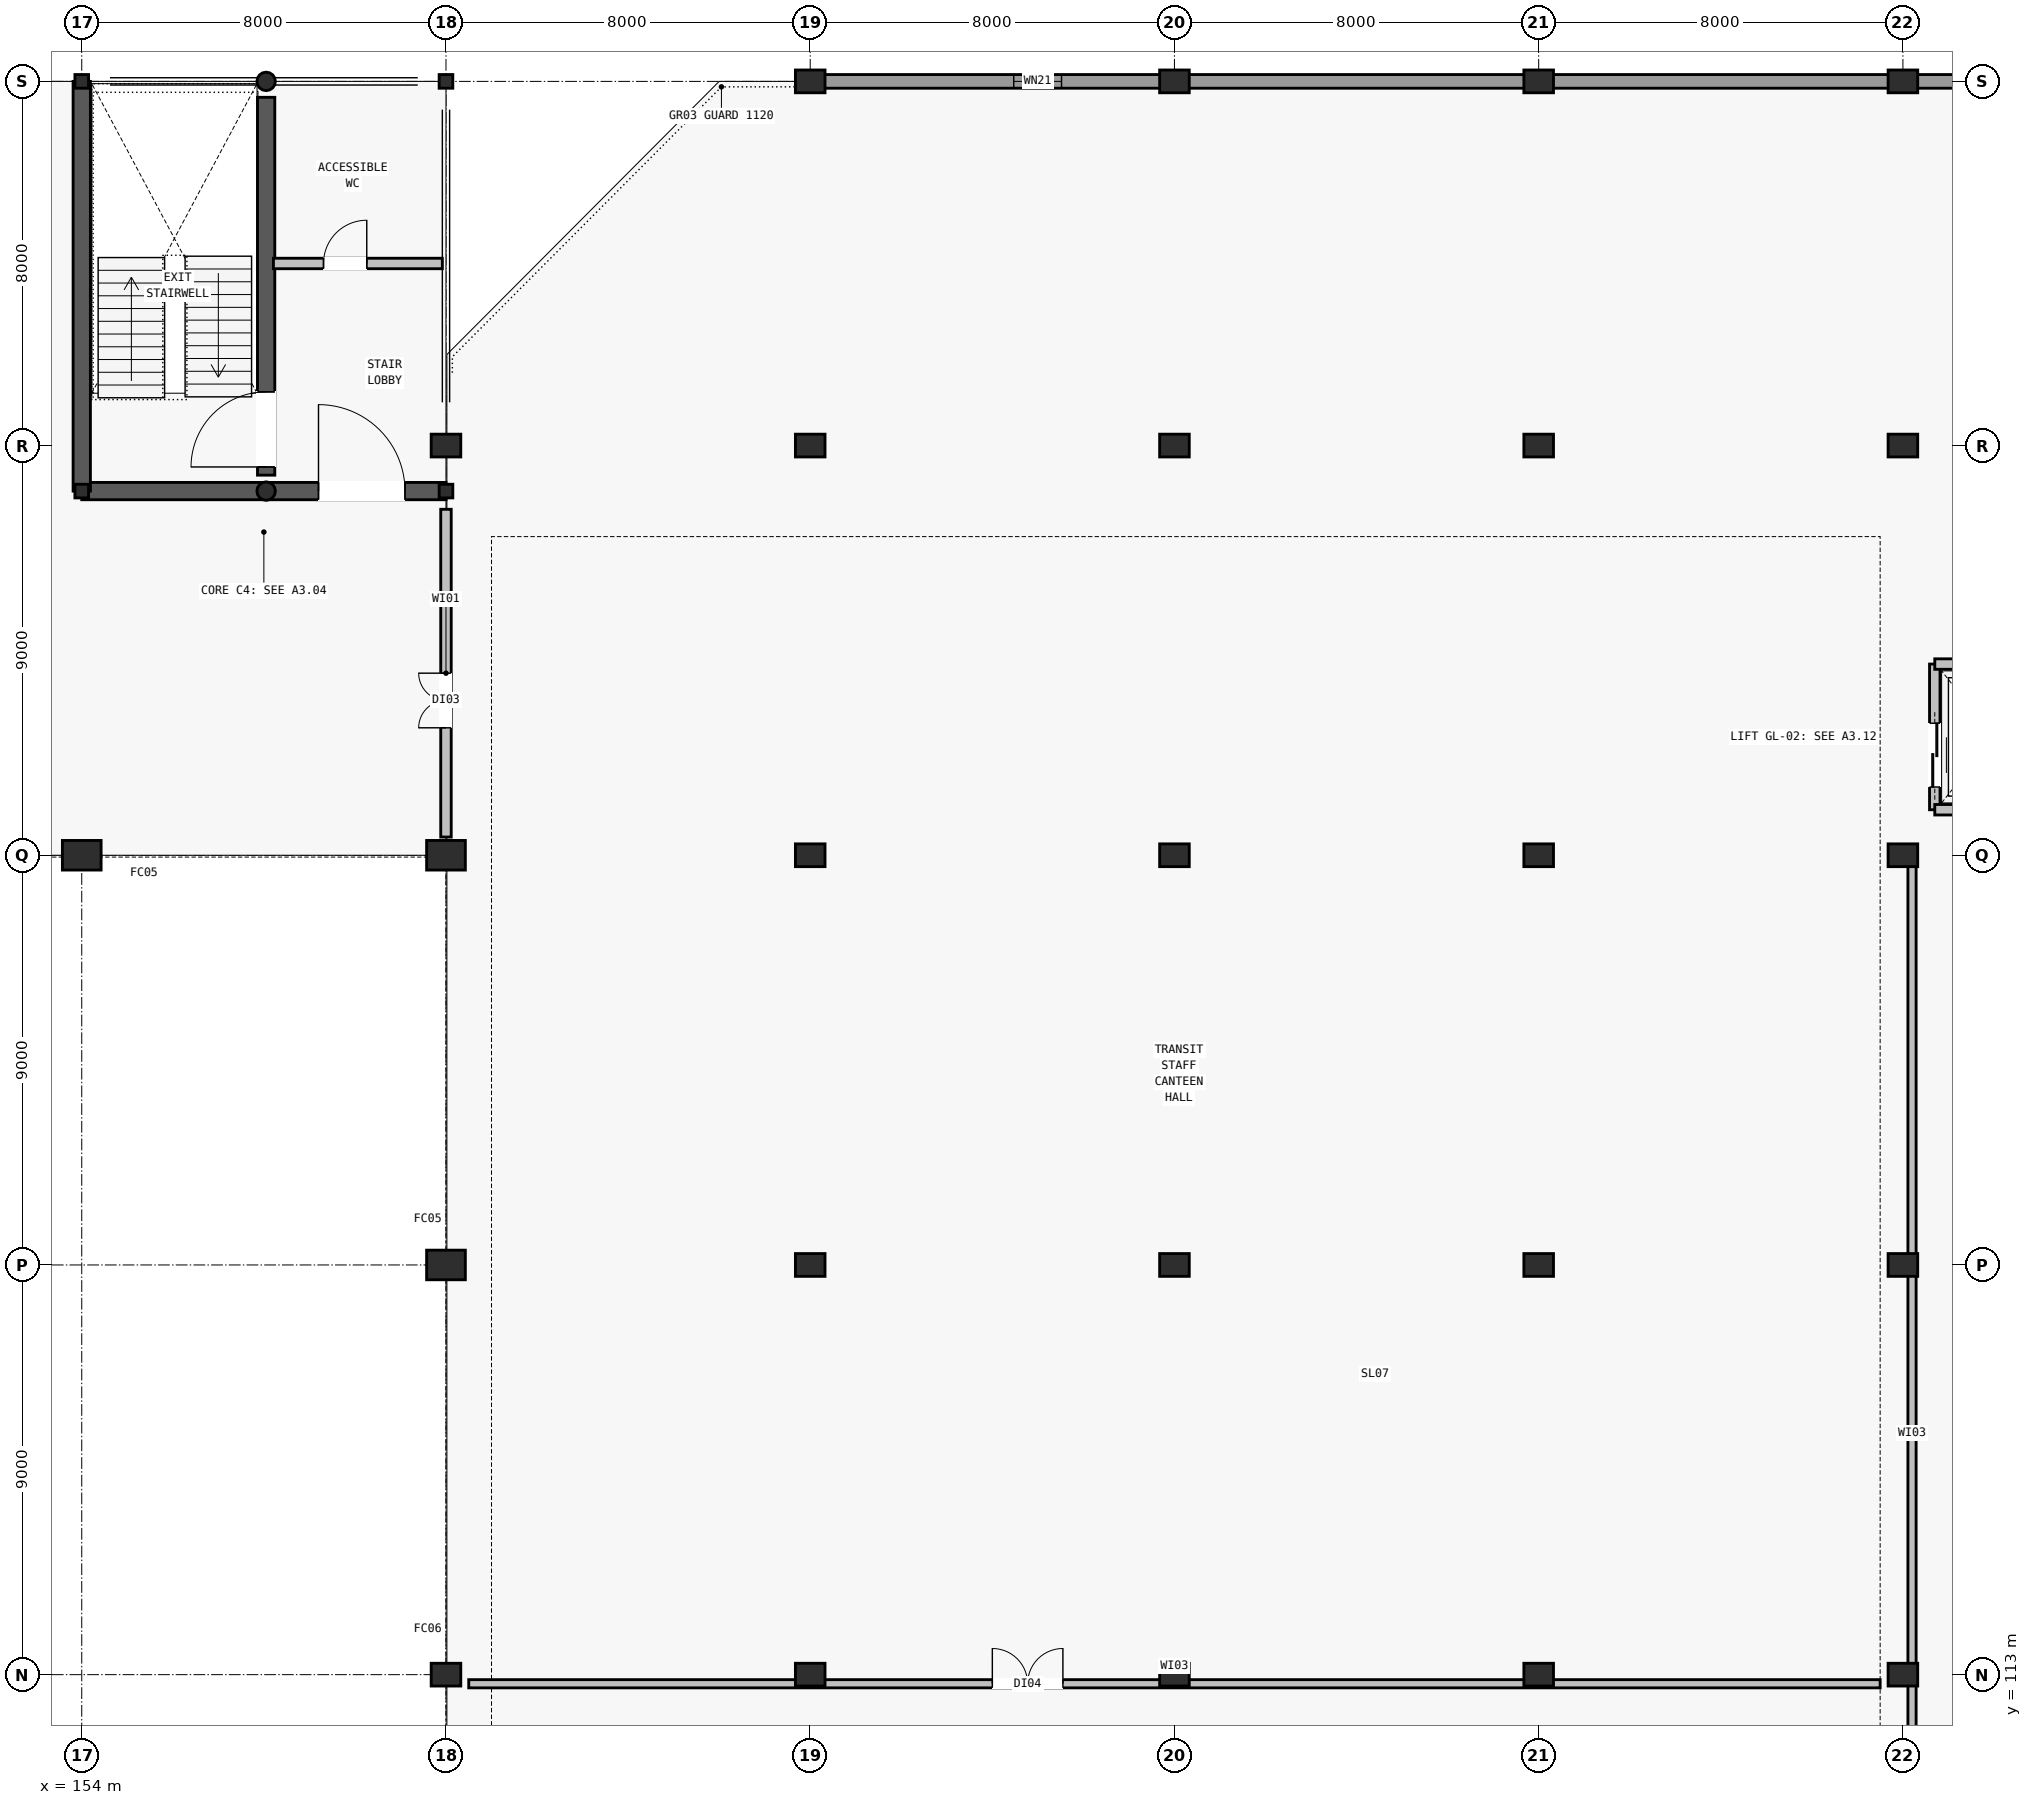
"""IFC4 building model, lengths in metres.
Left out: names, types, materials, properties, quantities, classifications, styles, units other than length and angle.
Written with IfcOpenShell. Run it as: python <this file> out.ifc"""

import sys

from ifc_helpers import new_model, si_unit, direction, frame, frame_2d, origin, origin_2d, place, context, subcontext, project, spatial, rectangle, hollow_circle, i_section, extrude, element, fill, save


model = new_model("IFC4")
c1 = context("Model", 3, precision=1e-05, world=origin(), true_north=direction((0.0, 1.0)))
c2 = subcontext(c1, "Body", "Model", "MODEL_VIEW")
j1 = project(units=[si_unit("LENGTHUNIT", "METRE"), si_unit("PLANEANGLEUNIT", "RADIAN")], contexts=[c1])
p1 = place(None, origin())
s1 = spatial("IfcSite", under=j1, at=p1, CompositionType="ELEMENT")
p2 = place(p1, origin())
s2 = spatial("IfcBuilding", under=s1, at=p2, CompositionType="ELEMENT")
p3 = place(p2, frame((0.0, 0.0, 13.4)))
s3 = spatial("IfcBuildingStorey", under=s2, at=p3, CompositionType="ELEMENT", Elevation=13.4)
for number, where, z_axis, x_axis in (
    (1, (154.0, 148.0, 0.0), (0.0, 0.0, 1.0), (1.0, 0.0, 0.0)),
    (2, (162.0, 148.0, 0.0), (0.0, 0.0, 1.0), (1.0, 0.0, 0.0)),
    (3, (154.0, 139.0, 0.0), (0.0, 0.0, 1.0), (1.0, 0.0, 0.0)),
    (4, (162.0, 139.0, 0.0), (0.0, 0.0, 1.0), (1.0, 0.0, 0.0)),
):
    element("IfcColumn", number, at=place(p3, frame(where, z_axis=z_axis, x_axis=x_axis)), inside=s3, PredefinedType="COLUMN", context=c2, shape_type="SweptSolid", body=[
        extrude(i_section(OverallWidth=0.3, OverallDepth=0.3, WebThickness=0.01, FlangeThickness=0.015, FilletRadius=0.018, at=origin_2d()), origin(), (0.0, 0.0, 1.0), 3.9),
    ])
for number, where, z_axis, x_axis in (
    (5, (158.05, 139.0, 0.0), (0.0, 0.0, 1.0), (1.0, 0.0, 0.0)),
    (6, (158.05, 148.0, 0.0), (0.0, 0.0, 1.0), (1.0, 0.0, 0.0)),
):
    element("IfcColumn", number, at=place(p3, frame(where, z_axis=z_axis, x_axis=x_axis)), inside=s3, PredefinedType="COLUMN", context=c2, shape_type="SweptSolid", body=[
        extrude(hollow_circle(Radius=0.203, WallThickness=0.014, at=origin_2d()), origin(), (0.0, 0.0, 1.0), 3.9),
    ])
for number, where, z_axis, x_axis in (
    (7, (154.0, 131.0, 0.0), (0.0, 0.0, 1.0), (1.0, 0.0, 0.0)),
    (8, (162.0, 122.0, 0.0), (0.0, 0.0, 1.0), (1.0, 0.0, 0.0)),
    (9, (162.0, 131.0, 0.0), (0.0, 0.0, 1.0), (1.0, 0.0, 0.0)),
):
    element("IfcColumn", number, at=place(p3, frame(where, z_axis=z_axis, x_axis=x_axis)), inside=s3, PredefinedType="COLUMN", context=c2, shape_type="SweptSolid", body=[
        extrude(rectangle(XDim=0.85, YDim=0.65, at=origin_2d()), origin(), (0.0, 0.0, 1.0), 3.9),
    ])
for number, where, z_axis, x_axis in (
    (10, (162.0, 113.0, 0.0), (0.0, 0.0, 1.0), (1.0, 0.0, 0.0)),
    (11, (162.0, 140.0, 0.0), (0.0, 0.0, 1.0), (1.0, 0.0, 0.0)),
    (12, (170.0, 113.0, 0.0), (0.0, 0.0, 1.0), (1.0, 0.0, 0.0)),
    (13, (170.0, 122.0, 0.0), (0.0, 0.0, 1.0), (1.0, 0.0, 0.0)),
    (14, (170.0, 131.0, 0.0), (0.0, 0.0, 1.0), (1.0, 0.0, 0.0)),
    (15, (170.0, 140.0, 0.0), (0.0, 0.0, 1.0), (1.0, 0.0, 0.0)),
    (16, (170.0, 148.0, 0.0), (0.0, 0.0, 1.0), (1.0, 0.0, 0.0)),
    (17, (178.0, 113.0, 0.0), (0.0, 0.0, 1.0), (1.0, 0.0, 0.0)),
    (18, (178.0, 122.0, 0.0), (0.0, 0.0, 1.0), (1.0, 0.0, 0.0)),
    (19, (178.0, 131.0, 0.0), (0.0, 0.0, 1.0), (1.0, 0.0, 0.0)),
    (20, (178.0, 140.0, 0.0), (0.0, 0.0, 1.0), (1.0, 0.0, 0.0)),
    (21, (178.0, 148.0, 0.0), (0.0, 0.0, 1.0), (1.0, 0.0, 0.0)),
    (22, (186.0, 113.0, 0.0), (0.0, 0.0, 1.0), (1.0, 0.0, 0.0)),
    (23, (186.0, 122.0, 0.0), (0.0, 0.0, 1.0), (1.0, 0.0, 0.0)),
    (24, (186.0, 131.0, 0.0), (0.0, 0.0, 1.0), (1.0, 0.0, 0.0)),
    (25, (186.0, 140.0, 0.0), (0.0, 0.0, 1.0), (1.0, 0.0, 0.0)),
    (26, (186.0, 148.0, 0.0), (0.0, 0.0, 1.0), (1.0, 0.0, 0.0)),
    (27, (194.0, 113.0, 0.0), (0.0, 0.0, 1.0), (1.0, 0.0, 0.0)),
    (28, (194.0, 122.0, 0.0), (0.0, 0.0, 1.0), (1.0, 0.0, 0.0)),
    (29, (194.0, 131.0, 0.0), (0.0, 0.0, 1.0), (1.0, 0.0, 0.0)),
    (30, (194.0, 140.0, 0.0), (0.0, 0.0, 1.0), (1.0, 0.0, 0.0)),
    (31, (194.0, 148.0, 0.0), (0.0, 0.0, 1.0), (1.0, 0.0, 0.0)),
):
    element("IfcColumn", number, at=place(p3, frame(where, z_axis=z_axis, x_axis=x_axis)), inside=s3, PredefinedType="COLUMN", context=c2, shape_type="SweptSolid", body=[
        extrude(rectangle(XDim=0.65, YDim=0.5, at=origin_2d()), origin(), (0.0, 0.0, 1.0), 3.9),
    ])
p4 = place(p3, frame((177.695, 148.0, 0.0), z_axis=(0.0, 0.0, 1.0), x_axis=(-1.0, 0.0, 0.0)))
e32 = element("IfcWall", 32, at=p4, inside=s3, PredefinedType="STANDARD", context=c2, shape_type="SweptSolid", body=[
    extrude(rectangle(XDim=7.39, YDim=0.3, at=frame_2d((3.695, 0.0))), origin(), (0.0, 0.0, 1.0), 2.48),
])
p5 = place(p4, frame((2.175, 0.0, 0.95)))
e33 = element("IfcOpeningElement", 33, at=p5, cuts=e32, PredefinedType="OPENING", context=c2, shape_type="SweptSolid", body=[
    extrude(rectangle(XDim=1.05, YDim=1.25, at=frame_2d((0.525, 0.625))), frame((0.0, 0.16, 0.0), z_axis=(0.0, -1.0, 0.0), x_axis=(1.0, 0.0, 0.0)), (0.0, 0.0, 1.0), 0.32),
])
for number, where, z_axis, x_axis in (
    (34, (185.695, 148.0, 0.0), (0.0, 0.0, 1.0), (-1.0, 0.0, 0.0)),
    (35, (193.695, 148.0, 0.0), (0.0, 0.0, 1.0), (-1.0, 0.0, 0.0)),
    (36, (201.695, 148.0, 0.0), (0.0, 0.0, 1.0), (-1.0, 0.0, 0.0)),
):
    element("IfcWall", number, at=place(p3, frame(where, z_axis=z_axis, x_axis=x_axis)), inside=s3, PredefinedType="STANDARD", context=c2, shape_type="SweptSolid", body=[
        extrude(rectangle(XDim=7.39, YDim=0.3, at=frame_2d((3.695, 0.0))), origin(), (0.0, 0.0, 1.0), 2.48),
    ])
p6 = place(p3, frame((154.0, 139.0, 0.0), z_axis=(0.0, 0.0, 1.0), x_axis=(1.0, 0.0, 0.0)))
e37 = element("IfcWall", 37, at=p6, inside=s3, PredefinedType="SHEAR", context=c2, shape_type="SweptSolid", body=[
    extrude(rectangle(XDim=8.0, YDim=0.38, at=frame_2d((4.0, 0.0))), origin(), (0.0, 0.0, 1.0), 3.62),
])
p7 = place(p6, frame((5.2, 0.0, 0.0)))
e38 = element("IfcOpeningElement", 38, at=p7, cuts=e37, PredefinedType="OPENING", context=c2, shape_type="SweptSolid", body=[
    extrude(rectangle(XDim=1.9, YDim=2.3, at=frame_2d((0.95, 1.15))), frame((0.0, 0.2, 0.0), z_axis=(0.0, -1.0, 0.0), x_axis=(1.0, 0.0, 0.0)), (0.0, 0.0, 1.0), 0.4),
])
p8 = place(p3, frame((154.0, 148.0, 0.0), z_axis=(0.0, 0.0, 1.0), x_axis=(0.0, -1.0, 0.0)))
e39 = element("IfcWall", 39, at=p8, inside=s3, PredefinedType="SHEAR", context=c2, shape_type="SweptSolid", body=[
    extrude(rectangle(XDim=9.0, YDim=0.38, at=frame_2d((4.5, 0.0))), origin(), (0.0, 0.0, 1.0), 3.62),
])
p9 = place(p3, frame((158.05, 139.35, 0.0), z_axis=(0.0, 0.0, 1.0), x_axis=(0.0, 1.0, 0.0)))
e40 = element("IfcWall", 40, at=p9, inside=s3, PredefinedType="SHEAR", context=c2, shape_type="SweptSolid", body=[
    extrude(rectangle(XDim=8.3, YDim=0.38, at=frame_2d((4.15, 0.0))), origin(), (0.0, 0.0, 1.0), 3.62),
])
p10 = place(p9, frame((0.18, 0.0, 0.0)))
e41 = element("IfcOpeningElement", 41, at=p10, cuts=e40, PredefinedType="OPENING", context=c2, shape_type="SweptSolid", body=[
    extrude(rectangle(XDim=1.65, YDim=2.2, at=frame_2d((0.825, 1.1))), frame((0.0, 0.2, 0.0), z_axis=(0.0, -1.0, 0.0), x_axis=(1.0, 0.0, 0.0)), (0.0, 0.0, 1.0), 0.4),
])
p11 = place(p3, frame((158.21, 144.0, 0.0), z_axis=(0.0, 0.0, 1.0), x_axis=(1.0, 0.0, 0.0)))
e42 = element("IfcWall", 42, at=p11, inside=s3, PredefinedType="PARTITIONING", context=c2, shape_type="SweptSolid", body=[
    extrude(rectangle(XDim=3.71, YDim=0.23, at=frame_2d((1.855, 0.0))), origin(), (0.0, 0.0, 1.0), 2.48),
])
p12 = place(p11, frame((1.1, 0.0, 0.0)))
e43 = element("IfcOpeningElement", 43, at=p12, cuts=e42, PredefinedType="OPENING", context=c2, shape_type="SweptSolid", body=[
    extrude(rectangle(XDim=0.95, YDim=2.1, at=frame_2d((0.475, 1.05))), frame((0.0, 0.125, 0.0), z_axis=(0.0, -1.0, 0.0), x_axis=(1.0, 0.0, 0.0)), (0.0, 0.0, 1.0), 0.25),
])
p13 = place(p3, frame((194.7, 132.0, 0.0), z_axis=(0.0, 0.0, 1.0), x_axis=(0.0, 1.0, 0.0)))
e44 = element("IfcWall", 44, at=p13, inside=s3, PredefinedType="PARTITIONING", context=c2, shape_type="SweptSolid", body=[
    extrude(rectangle(XDim=3.2, YDim=0.23, at=frame_2d((1.6, 0.0))), origin(), (0.0, 0.0, 1.0), 2.48),
])
p14 = place(p13, frame((0.5, 0.0, 0.0)))
e45 = element("IfcOpeningElement", 45, at=p14, cuts=e44, PredefinedType="OPENING", context=c2, shape_type="SweptSolid", body=[
    extrude(rectangle(XDim=1.4, YDim=2.3, at=frame_2d((0.7, 1.15))), frame((0.0, 0.125, 0.0), z_axis=(0.0, -1.0, 0.0), x_axis=(1.0, 0.0, 0.0)), (0.0, 0.0, 1.0), 0.25),
])
for number, where, z_axis, x_axis in (
    (46, (194.7, 135.2, 0.0), (0.0, 0.0, 1.0), (1.0, 0.0, 0.0)),
    (47, (197.3, 132.0, 0.0), (0.0, 0.0, 1.0), (-1.0, 0.0, 0.0)),
):
    element("IfcWall", number, at=place(p3, frame(where, z_axis=z_axis, x_axis=x_axis)), inside=s3, PredefinedType="PARTITIONING", context=c2, shape_type="SweptSolid", body=[
        extrude(rectangle(XDim=2.6, YDim=0.23, at=frame_2d((1.3, 0.0))), origin(), (0.0, 0.0, 1.0), 2.48),
    ])
p15 = place(p3, frame((162.0, 131.4, 0.0), z_axis=(0.0, 0.0, 1.0), x_axis=(0.0, 1.0, 0.0)))
e48 = element("IfcWall", 48, at=p15, inside=s3, PredefinedType="PARTITIONING", context=c2, shape_type="SweptSolid", body=[
    extrude(rectangle(XDim=7.2, YDim=0.23, at=frame_2d((3.6, 0.0))), origin(), (0.0, 0.0, 1.0), 2.48),
])
p16 = place(p15, frame((2.4, 0.0, 0.0)))
e49 = element("IfcOpeningElement", 49, at=p16, cuts=e48, PredefinedType="OPENING", context=c2, shape_type="SweptSolid", body=[
    extrude(rectangle(XDim=1.2, YDim=2.2, at=frame_2d((0.6, 1.1))), frame((0.0, 0.125, 0.0), z_axis=(0.0, -1.0, 0.0), x_axis=(1.0, 0.0, 0.0)), (0.0, 0.0, 1.0), 0.25),
])
p17 = place(p3, frame((162.5, 112.8, 0.0), z_axis=(0.0, 0.0, 1.0), x_axis=(1.0, 0.0, 0.0)))
e50 = element("IfcWall", 50, at=p17, inside=s3, PredefinedType="PARTITIONING", context=c2, shape_type="SweptSolid", body=[
    extrude(rectangle(XDim=31.0, YDim=0.18, at=frame_2d((15.5, 0.0))), origin(), (0.0, 0.0, 1.0), 2.48),
])
p18 = place(p17, frame((11.5, 0.0, 0.0)))
e51 = element("IfcOpeningElement", 51, at=p18, cuts=e50, PredefinedType="OPENING", context=c2, shape_type="SweptSolid", body=[
    extrude(rectangle(XDim=1.55, YDim=2.2, at=frame_2d((0.775, 1.1))), frame((0.0, 0.1, 0.0), z_axis=(0.0, -1.0, 0.0), x_axis=(1.0, 0.0, 0.0)), (0.0, 0.0, 1.0), 0.2),
])
p19 = place(p3, frame((194.2, 86.2, 0.0), z_axis=(0.0, 0.0, 1.0), x_axis=(0.0, 1.0, 0.0)))
e52 = element("IfcWall", 52, at=p19, inside=s3, PredefinedType="PARTITIONING", context=c2, shape_type="SweptSolid", body=[
    extrude(rectangle(XDim=45.0, YDim=0.18, at=frame_2d((22.5, 0.0))), origin(), (0.0, 0.0, 1.0), 2.48),
])
p20 = place(p19, frame((13.0, 0.0, 0.0)))
e53 = element("IfcOpeningElement", 53, at=p20, cuts=e52, PredefinedType="OPENING", context=c2, shape_type="SweptSolid", body=[
    extrude(rectangle(XDim=2.1, YDim=2.35, at=frame_2d((1.05, 1.175))), frame((0.0, 0.1, 0.0), z_axis=(0.0, -1.0, 0.0), x_axis=(1.0, 0.0, 0.0)), (0.0, 0.0, 1.0), 0.2),
])
p21 = place(p5, origin())
e54 = element("IfcWindow", 54, at=p21, inside=s3, PartitioningType="SINGLE_PANEL", PredefinedType="WINDOW", context=c2, shape_type="SweptSolid", body=[
    extrude(rectangle(XDim=1.05, YDim=1.25, at=frame_2d((0.525, 0.625))), frame((0.0, 0.03, 0.0), z_axis=(0.0, -1.0, 0.0), x_axis=(1.0, 0.0, 0.0)), (0.0, 0.0, 1.0), 0.06),
])
fill(e33, e54)
p22 = place(p7, origin())
e55 = element("IfcDoor", 55, at=p22, inside=s3, OperationType="SINGLE_SWING_LEFT", PredefinedType="DOOR", context=c2, shape_type="SweptSolid", body=[
    extrude(rectangle(XDim=1.9, YDim=2.3, at=frame_2d((0.95, 1.15))), frame((0.0, 0.025, 0.0), z_axis=(0.0, -1.0, 0.0), x_axis=(1.0, 0.0, 0.0)), (0.0, 0.0, 1.0), 0.05),
])
fill(e38, e55)
p23 = place(p10, origin())
e56 = element("IfcDoor", 56, at=p23, inside=s3, OperationType="SINGLE_SWING_LEFT", PredefinedType="DOOR", context=c2, shape_type="SweptSolid", body=[
    extrude(rectangle(XDim=1.65, YDim=2.2, at=frame_2d((0.825, 1.1))), frame((0.0, 0.025, 0.0), z_axis=(0.0, -1.0, 0.0), x_axis=(1.0, 0.0, 0.0)), (0.0, 0.0, 1.0), 0.05),
])
fill(e41, e56)
p24 = place(p12, origin())
e57 = element("IfcDoor", 57, at=p24, inside=s3, OperationType="SINGLE_SWING_RIGHT", PredefinedType="DOOR", context=c2, shape_type="SweptSolid", body=[
    extrude(rectangle(XDim=0.95, YDim=2.1, at=frame_2d((0.475, 1.05))), frame((0.0, 0.025, 0.0), z_axis=(0.0, -1.0, 0.0), x_axis=(1.0, 0.0, 0.0)), (0.0, 0.0, 1.0), 0.05),
])
fill(e43, e57)
p25 = place(p14, origin())
e58 = element("IfcDoor", 58, at=p25, inside=s3, OperationType="SLIDING_TO_RIGHT", PredefinedType="DOOR", context=c2, shape_type="SweptSolid", body=[
    extrude(rectangle(XDim=1.4, YDim=2.3, at=frame_2d((0.7, 1.15))), frame((0.0, 0.025, 0.0), z_axis=(0.0, -1.0, 0.0), x_axis=(1.0, 0.0, 0.0)), (0.0, 0.0, 1.0), 0.05),
])
fill(e45, e58)
p26 = place(p16, origin())
e59 = element("IfcDoor", 59, at=p26, inside=s3, OperationType="DOUBLE_SWING_LEFT", PredefinedType="DOOR", context=c2, shape_type="SweptSolid", body=[
    extrude(rectangle(XDim=1.2, YDim=2.2, at=frame_2d((0.6, 1.1))), frame((0.0, 0.025, 0.0), z_axis=(0.0, -1.0, 0.0), x_axis=(1.0, 0.0, 0.0)), (0.0, 0.0, 1.0), 0.05),
])
fill(e49, e59)
p27 = place(p18, origin())
e60 = element("IfcDoor", 60, at=p27, inside=s3, OperationType="DOUBLE_SWING_LEFT", PredefinedType="DOOR", context=c2, shape_type="SweptSolid", body=[
    extrude(rectangle(XDim=1.55, YDim=2.2, at=frame_2d((0.775, 1.1))), frame((0.0, 0.025, 0.0), z_axis=(0.0, -1.0, 0.0), x_axis=(1.0, 0.0, 0.0)), (0.0, 0.0, 1.0), 0.05),
])
fill(e51, e60)
save(model, sys.argv[1])
